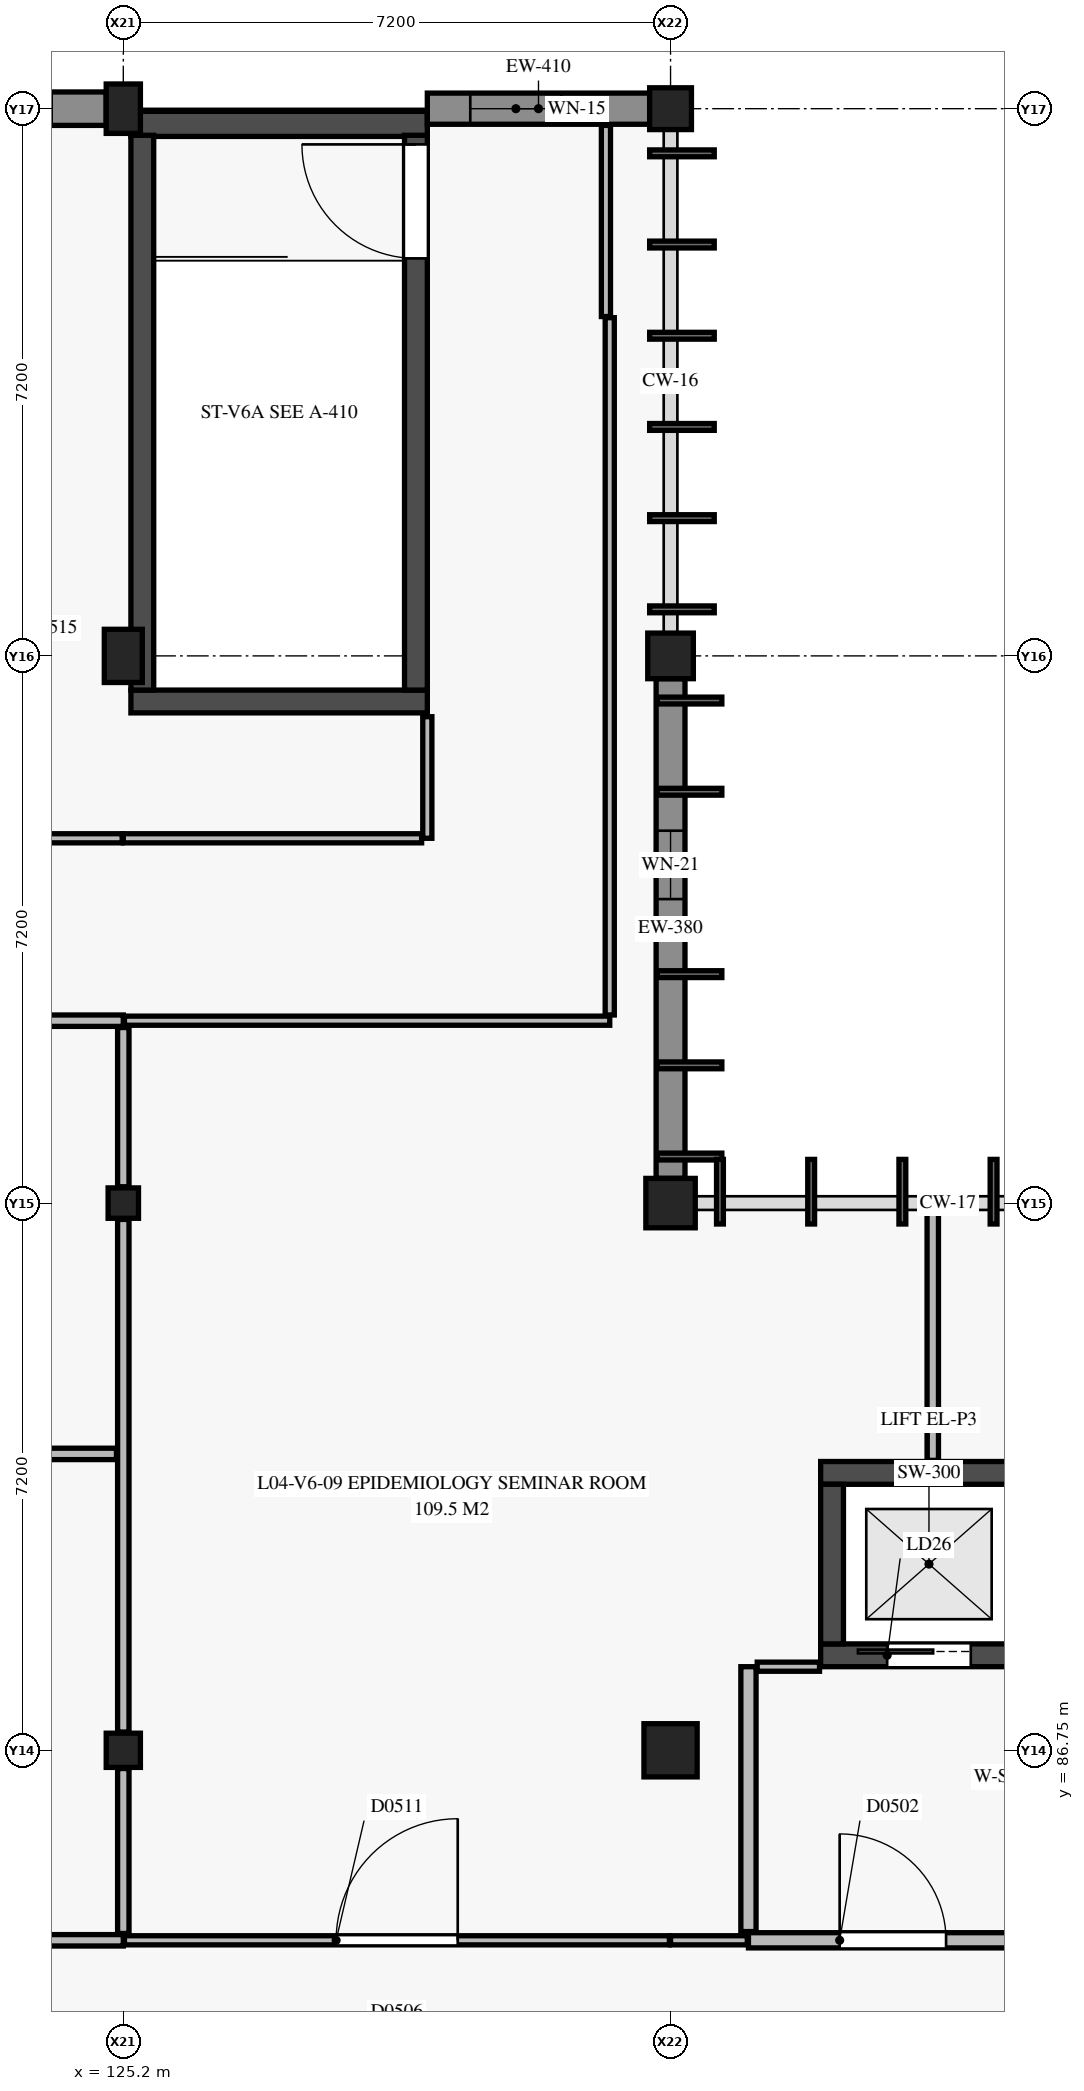
"""IFC4 building model, lengths in metres.
Left out: names, types, materials, properties, quantities, classifications, styles, units other than length and angle.
Written with IfcOpenShell. Run it as: python <this file> out.ifc"""

import sys

from ifc_helpers import new_model, si_unit, direction, frame, frame_2d, origin, origin_2d, place, context, subcontext, project, spatial, rectangle, extrude, element, fill, save


model = new_model("IFC4")
c1 = context("Model", 3, precision=1e-05, world=origin(), true_north=direction((0.0, 1.0)))
c2 = subcontext(c1, "Body", "Model", "MODEL_VIEW")
j1 = project(units=[si_unit("LENGTHUNIT", "METRE"), si_unit("PLANEANGLEUNIT", "RADIAN")], contexts=[c1])
p1 = place(None, origin())
s1 = spatial("IfcSite", under=j1, at=p1, CompositionType="ELEMENT")
p2 = place(p1, origin())
s2 = spatial("IfcBuilding", under=s1, at=p2, CompositionType="ELEMENT")
p3 = place(p2, frame((0.0, 0.0, 17.4)))
s3 = spatial("IfcBuildingStorey", under=s2, at=p3, CompositionType="ELEMENT", Elevation=17.4)
p4 = place(p3, frame((125.2, 86.75, 0.0), z_axis=(0.0, 0.0, 1.0), x_axis=(1.0, 0.0, 0.0)))
e1 = element("IfcColumn", 1, at=p4, inside=s3, PredefinedType="COLUMN", context=c2, shape_type="SweptSolid", body=[
    extrude(rectangle(XDim=0.45, YDim=0.45, at=origin_2d()), origin(), (0.0, 0.0, 1.0), 4.05),
])
p5 = place(p3, frame((125.2, 93.95, 0.0), z_axis=(0.0, 0.0, 1.0), x_axis=(1.0, 0.0, 0.0)))
e2 = element("IfcColumn", 2, at=p5, inside=s3, PredefinedType="COLUMN", context=c2, shape_type="SweptSolid", body=[
    extrude(rectangle(XDim=0.4, YDim=0.4, at=origin_2d()), origin(), (0.0, 0.0, 1.0), 4.36),
])
p6 = place(p3, frame((125.2, 101.15, 0.0), z_axis=(0.0, 0.0, 1.0), x_axis=(1.0, 0.0, 0.0)))
e3 = element("IfcColumn", 3, at=p6, inside=s3, PredefinedType="COLUMN", context=c2, shape_type="SweptSolid", body=[
    extrude(rectangle(XDim=0.5, YDim=0.7, at=origin_2d()), origin(), (0.0, 0.0, 1.0), 4.05),
])
p7 = place(p3, frame((125.2, 108.35, 0.0), z_axis=(0.0, 0.0, 1.0), x_axis=(1.0, 0.0, 0.0)))
e4 = element("IfcColumn", 4, at=p7, inside=s3, PredefinedType="COLUMN", context=c2, shape_type="SweptSolid", body=[
    extrude(rectangle(XDim=0.45, YDim=0.65, at=origin_2d()), origin(), (0.0, 0.0, 1.0), 4.36),
])
p8 = place(p3, frame((132.4, 86.75, 0.0), z_axis=(0.0, 0.0, 1.0), x_axis=(1.0, 0.0, 0.0)))
e5 = element("IfcColumn", 5, at=p8, inside=s3, PredefinedType="COLUMN", context=c2, shape_type="SweptSolid", body=[
    extrude(rectangle(XDim=0.7, YDim=0.7, at=origin_2d()), origin(), (0.0, 0.0, 1.0), 4.05),
])
p9 = place(p3, frame((132.4, 93.95, 0.0), z_axis=(0.0, 0.0, 1.0), x_axis=(1.0, 0.0, 0.0)))
e6 = element("IfcColumn", 6, at=p9, inside=s3, PredefinedType="COLUMN", context=c2, shape_type="SweptSolid", body=[
    extrude(rectangle(XDim=0.65, YDim=0.65, at=origin_2d()), origin(), (0.0, 0.0, 1.0), 4.36),
])
p10 = place(p3, frame((132.4, 101.15, 0.0), z_axis=(0.0, 0.0, 1.0), x_axis=(1.0, 0.0, 0.0)))
e7 = element("IfcColumn", 7, at=p10, inside=s3, PredefinedType="COLUMN", context=c2, shape_type="SweptSolid", body=[
    extrude(rectangle(XDim=0.6, YDim=0.6, at=origin_2d()), origin(), (0.0, 0.0, 1.0), 4.05),
])
p11 = place(p3, frame((132.4, 108.35, 0.0), z_axis=(0.0, 0.0, 1.0), x_axis=(1.0, 0.0, 0.0)))
e8 = element("IfcColumn", 8, at=p11, inside=s3, PredefinedType="COLUMN", context=c2, shape_type="SweptSolid", body=[
    extrude(rectangle(XDim=0.55, YDim=0.55, at=origin_2d()), origin(), (0.0, 0.0, 1.0), 4.36),
])
p12 = place(p3, frame((125.3, 100.55, 0.0), z_axis=(0.0, 0.0, 1.0), x_axis=(1.0, 0.0, 0.0)))
e9 = element("IfcWall", 9, at=p12, inside=s3, PredefinedType="SHEAR", context=c2, shape_type="SweptSolid", body=[
    extrude(rectangle(XDim=3.9, YDim=0.3, at=frame_2d((1.95, 0.0))), origin(), (0.0, 0.0, 1.0), 4.2),
])
p13 = place(p3, frame((125.3, 108.15, 0.0), z_axis=(0.0, 0.0, 1.0), x_axis=(1.0, 0.0, 0.0)))
e10 = element("IfcWall", 10, at=p13, inside=s3, PredefinedType="SHEAR", context=c2, shape_type="SweptSolid", body=[
    extrude(rectangle(XDim=3.9, YDim=0.33, at=frame_2d((1.95, 0.0))), origin(), (0.0, 0.0, 1.0), 4.2),
])
p14 = place(p3, frame((125.45, 100.7, 0.0), z_axis=(0.0, 0.0, 1.0), x_axis=(0.0, 1.0, 0.0)))
e11 = element("IfcWall", 11, at=p14, inside=s3, PredefinedType="SHEAR", context=c2, shape_type="SweptSolid", body=[
    extrude(rectangle(XDim=7.3, YDim=0.3, at=frame_2d((3.65, 0.0))), origin(), (0.0, 0.0, 1.0), 4.2),
])
p15 = place(p3, frame((129.05, 100.7, 0.0), z_axis=(0.0, 0.0, 1.0), x_axis=(0.0, 1.0, 0.0)))
e12 = element("IfcWall", 12, at=p15, inside=s3, PredefinedType="SHEAR", context=c2, shape_type="SweptSolid", body=[
    extrude(rectangle(XDim=7.3, YDim=0.3, at=frame_2d((3.65, 0.0))), origin(), (0.0, 0.0, 1.0), 4.2),
])
p16 = place(p15, frame((5.68, 0.0, 0.0)))
e13 = element("IfcOpeningElement", 13, at=p16, cuts=e12, PredefinedType="OPENING", context=c2, shape_type="SweptSolid", body=[
    extrude(rectangle(XDim=1.5, YDim=2.15, at=frame_2d((0.75, 1.075))), frame((0.0, 0.16, 0.0), z_axis=(0.0, -1.0, 0.0), x_axis=(1.0, 0.0, 0.0)), (0.0, 0.0, 1.0), 0.32),
])
p17 = place(p3, frame((134.375, 88.0, 0.0), z_axis=(0.0, 0.0, 1.0), x_axis=(1.0, 0.0, 0.0)))
e14 = element("IfcWall", 14, at=p17, inside=s3, PredefinedType="SHEAR", context=c2, shape_type="SweptSolid", body=[
    extrude(rectangle(XDim=2.85, YDim=0.3, at=frame_2d((1.425, 0.0))), origin(), (0.0, 0.0, 1.0), 3.95),
])
p18 = place(p17, frame((0.875, 0.0, 0.0)))
e15 = element("IfcOpeningElement", 15, at=p18, cuts=e14, PredefinedType="OPENING", context=c2, shape_type="SweptSolid", body=[
    extrude(rectangle(XDim=1.1, YDim=2.15, at=frame_2d((0.55, 1.075))), frame((0.0, 0.16, 0.0), z_axis=(0.0, -1.0, 0.0), x_axis=(1.0, 0.0, 0.0)), (0.0, 0.0, 1.0), 0.32),
])
p19 = place(p3, frame((134.375, 90.4, 0.0), z_axis=(0.0, 0.0, 1.0), x_axis=(1.0, 0.0, 0.0)))
e16 = element("IfcWall", 16, at=p19, inside=s3, PredefinedType="SHEAR", context=c2, shape_type="SweptSolid", body=[
    extrude(rectangle(XDim=2.85, YDim=0.3, at=frame_2d((1.425, 0.0))), origin(), (0.0, 0.0, 1.0), 3.95),
])
p20 = place(p3, frame((134.525, 88.15, 0.0), z_axis=(0.0, 0.0, 1.0), x_axis=(0.0, 1.0, 0.0)))
e17 = element("IfcWall", 17, at=p20, inside=s3, PredefinedType="SHEAR", context=c2, shape_type="SweptSolid", body=[
    extrude(rectangle(XDim=2.1, YDim=0.3, at=frame_2d((1.05, 0.0))), origin(), (0.0, 0.0, 1.0), 3.95),
])
p21 = place(p3, frame((121.74, 108.35, 0.0), z_axis=(0.0, 0.0, 1.0), x_axis=(1.0, 0.0, 0.0)))
e18 = element("IfcWall", 18, at=p21, inside=s3, PredefinedType="USERDEFINED", context=c2, shape_type="SweptSolid", body=[
    extrude(rectangle(XDim=3.235, YDim=0.44, at=frame_2d((1.618, 0.0))), origin(), (0.0, 0.0, 1.0), 3.38),
])
p22 = place(p21, frame((0.718, 0.0, 0.9)))
e19 = element("IfcOpeningElement", 19, at=p22, cuts=e18, PredefinedType="OPENING", context=c2, shape_type="SweptSolid", body=[
    extrude(rectangle(XDim=1.8, YDim=1.5, at=frame_2d((0.9, 0.75))), frame((0.0, 0.23, 0.0), z_axis=(0.0, -1.0, 0.0), x_axis=(1.0, 0.0, 0.0)), (0.0, 0.0, 1.0), 0.46),
])
p23 = place(p3, frame((129.2, 108.35, 0.0), z_axis=(0.0, 0.0, 1.0), x_axis=(1.0, 0.0, 0.0)))
e20 = element("IfcWall", 20, at=p23, inside=s3, PredefinedType="USERDEFINED", context=c2, shape_type="SweptSolid", body=[
    extrude(rectangle(XDim=2.925, YDim=0.41, at=frame_2d((1.462, 0.0))), origin(), (0.0, 0.0, 1.0), 3.38),
])
p24 = place(p23, frame((0.565, 0.0, 0.6)))
e21 = element("IfcOpeningElement", 21, at=p24, cuts=e20, PredefinedType="OPENING", context=c2, shape_type="SweptSolid", body=[
    extrude(rectangle(XDim=1.2, YDim=2.2, at=frame_2d((0.6, 1.1))), frame((0.0, 0.215, 0.0), z_axis=(0.0, -1.0, 0.0), x_axis=(1.0, 0.0, 0.0)), (0.0, 0.0, 1.0), 0.43),
])
p25 = place(p3, frame((132.4, 100.85, 0.0), z_axis=(0.0, 0.0, 1.0), x_axis=(0.0, -1.0, 0.0)))
e22 = element("IfcWall", 22, at=p25, inside=s3, PredefinedType="USERDEFINED", context=c2, shape_type="SweptSolid", body=[
    extrude(rectangle(XDim=6.575, YDim=0.38, at=frame_2d((3.288, 0.0))), origin(), (0.0, 0.0, 1.0), 3.38),
])
p26 = place(p25, frame((2.0, 0.0, 0.9)))
e23 = element("IfcOpeningElement", 23, at=p26, cuts=e22, PredefinedType="OPENING", context=c2, shape_type="SweptSolid", body=[
    extrude(rectangle(XDim=0.9, YDim=1.2, at=frame_2d((0.45, 0.6))), frame((0.0, 0.2, 0.0), z_axis=(0.0, -1.0, 0.0), x_axis=(1.0, 0.0, 0.0)), (0.0, 0.0, 1.0), 0.4),
])
p27 = place(p3, frame((133.425, 84.25, 0.0), z_axis=(0.0, 0.0, 1.0), x_axis=(1.0, 0.0, 0.0)))
e24 = element("IfcWall", 24, at=p27, inside=s3, PredefinedType="PARTITIONING", context=c2, shape_type="SweptSolid", body=[
    extrude(rectangle(XDim=3.8, YDim=0.2, at=frame_2d((1.9, 0.0))), origin(), (0.0, 0.0, 1.0), 3.95),
])
p28 = place(p27, frame((1.2, 0.0, 0.0)))
e25 = element("IfcOpeningElement", 25, at=p28, cuts=e24, PredefinedType="OPENING", context=c2, shape_type="SweptSolid", body=[
    extrude(rectangle(XDim=1.4, YDim=2.2, at=frame_2d((0.7, 1.1))), frame((0.0, 0.11, 0.0), z_axis=(0.0, -1.0, 0.0), x_axis=(1.0, 0.0, 0.0)), (0.0, 0.0, 1.0), 0.22),
])
p29 = place(p3, frame((133.425, 84.365, 0.0), z_axis=(0.0, 0.0, 1.0), x_axis=(0.0, 1.0, 0.0)))
e26 = element("IfcWall", 26, at=p29, inside=s3, PredefinedType="PARTITIONING", context=c2, shape_type="SweptSolid", body=[
    extrude(rectangle(XDim=3.485, YDim=0.2, at=frame_2d((1.743, 0.0))), origin(), (0.0, 0.0, 1.0), 3.44),
])
p30 = place(p3, frame((122.8, 84.25, 0.0), z_axis=(0.0, 0.0, 1.0), x_axis=(1.0, 0.0, 0.0)))
e27 = element("IfcWall", 27, at=p30, inside=s3, PredefinedType="PARTITIONING", context=c2, shape_type="SweptSolid", body=[
    extrude(rectangle(XDim=2.4, YDim=0.15, at=frame_2d((1.2, 0.0))), origin(), (0.0, 0.0, 1.0), 3.95),
])
p31 = place(p3, frame((122.89, 96.35, 0.0), z_axis=(0.0, 0.0, 1.0), x_axis=(1.0, 0.0, 0.0)))
e28 = element("IfcWall", 28, at=p31, inside=s3, PredefinedType="PARTITIONING", context=c2, shape_type="SweptSolid", body=[
    extrude(rectangle(XDim=2.31, YDim=0.15, at=frame_2d((1.155, 0.0))), origin(), (0.0, 0.0, 1.0), 3.95),
])
p32 = place(p3, frame((132.4, 84.25, 0.0), z_axis=(0.0, 0.0, 1.0), x_axis=(1.0, 0.0, 0.0)))
e29 = element("IfcWall", 29, at=p32, inside=s3, PredefinedType="PARTITIONING", context=c2, shape_type="SweptSolid", body=[
    extrude(rectangle(XDim=1.01, YDim=0.12, at=frame_2d((0.505, 0.0))), origin(), (0.0, 0.0, 1.0), 3.95),
])
p33 = place(p3, frame((125.215, 84.25, 0.0), z_axis=(0.0, 0.0, 1.0), x_axis=(1.0, 0.0, 0.0)))
e30 = element("IfcWall", 30, at=p33, inside=s3, PredefinedType="PARTITIONING", context=c2, shape_type="SweptSolid", body=[
    extrude(rectangle(XDim=7.17, YDim=0.12, at=frame_2d((3.585, 0.0))), origin(), (0.0, 0.0, 1.0), 3.95),
])
p34 = place(p33, frame((2.785, 0.0, 0.0)))
e31 = element("IfcOpeningElement", 31, at=p34, cuts=e30, PredefinedType="OPENING", context=c2, shape_type="SweptSolid", body=[
    extrude(rectangle(XDim=1.6, YDim=2.25, at=frame_2d((0.8, 1.125))), frame((0.0, 0.07, 0.0), z_axis=(0.0, -1.0, 0.0), x_axis=(1.0, 0.0, 0.0)), (0.0, 0.0, 1.0), 0.14),
])
p35 = place(p3, frame((125.215, 96.35, 0.0), z_axis=(0.0, 0.0, 1.0), x_axis=(1.0, 0.0, 0.0)))
e32 = element("IfcWall", 32, at=p35, inside=s3, PredefinedType="PARTITIONING", context=c2, shape_type="SweptSolid", body=[
    extrude(rectangle(XDim=6.385, YDim=0.12, at=frame_2d((3.192, 0.0))), origin(), (0.0, 0.0, 1.0), 3.95),
])
p36 = place(p3, frame((131.6, 96.425, 0.0), z_axis=(0.0, 0.0, 1.0), x_axis=(0.0, 1.0, 0.0)))
e33 = element("IfcWall", 33, at=p36, inside=s3, PredefinedType="PARTITIONING", context=c2, shape_type="SweptSolid", body=[
    extrude(rectangle(XDim=9.175, YDim=0.12, at=frame_2d((4.587, 0.0))), origin(), (0.0, 0.0, 1.0), 3.95),
])
p37 = place(p3, frame((131.55, 105.615, 0.0), z_axis=(0.0, 0.0, 1.0), x_axis=(0.0, 1.0, 0.0)))
e34 = element("IfcWall", 34, at=p37, inside=s3, PredefinedType="PARTITIONING", context=c2, shape_type="SweptSolid", body=[
    extrude(rectangle(XDim=2.515, YDim=0.12, at=frame_2d((1.257, 0.0))), origin(), (0.0, 0.0, 1.0), 3.95),
])
p38 = place(p3, frame((129.2, 98.75, 0.0), z_axis=(0.0, 0.0, 1.0), x_axis=(0.0, 1.0, 0.0)))
e35 = element("IfcWall", 35, at=p38, inside=s3, PredefinedType="PARTITIONING", context=c2, shape_type="SweptSolid", body=[
    extrude(rectangle(XDim=1.6, YDim=0.12, at=frame_2d((0.8, 0.0))), origin(), (0.0, 0.0, 1.0), 3.95),
])
p39 = place(p3, frame((125.2, 98.75, 0.0), z_axis=(0.0, 0.0, 1.0), x_axis=(1.0, 0.0, 0.0)))
e36 = element("IfcWall", 36, at=p39, inside=s3, PredefinedType="PARTITIONING", context=c2, shape_type="SweptSolid", body=[
    extrude(rectangle(XDim=3.925, YDim=0.12, at=frame_2d((1.962, 0.0))), origin(), (0.0, 0.0, 1.0), 3.95),
])
p40 = place(p3, frame((122.8, 98.75, 0.0), z_axis=(0.0, 0.0, 1.0), x_axis=(1.0, 0.0, 0.0)))
e37 = element("IfcWall", 37, at=p40, inside=s3, PredefinedType="PARTITIONING", context=c2, shape_type="SweptSolid", body=[
    extrude(rectangle(XDim=2.385, YDim=0.12, at=frame_2d((1.192, 0.0))), origin(), (0.0, 0.0, 1.0), 3.95),
])
p41 = place(p3, frame((125.2, 84.34, 0.0), z_axis=(0.0, 0.0, 1.0), x_axis=(0.0, 1.0, 0.0)))
e38 = element("IfcWall", 38, at=p41, inside=s3, PredefinedType="PARTITIONING", context=c2, shape_type="SweptSolid", body=[
    extrude(rectangle(XDim=2.17, YDim=0.15, at=frame_2d((1.085, 0.0))), origin(), (0.0, 0.0, 1.0), 3.95),
])
p42 = place(p3, frame((125.2, 86.99, 0.0), z_axis=(0.0, 0.0, 1.0), x_axis=(0.0, 1.0, 0.0)))
e39 = element("IfcWall", 39, at=p42, inside=s3, PredefinedType="PARTITIONING", context=c2, shape_type="SweptSolid", body=[
    extrude(rectangle(XDim=6.745, YDim=0.15, at=frame_2d((3.373, 0.0))), origin(), (0.0, 0.0, 1.0), 3.95),
])
p43 = place(p3, frame((125.2, 94.165, 0.0), z_axis=(0.0, 0.0, 1.0), x_axis=(0.0, 1.0, 0.0)))
e40 = element("IfcWall", 40, at=p43, inside=s3, PredefinedType="PARTITIONING", context=c2, shape_type="SweptSolid", body=[
    extrude(rectangle(XDim=2.095, YDim=0.15, at=frame_2d((1.047, 0.0))), origin(), (0.0, 0.0, 1.0), 3.95),
])
p44 = place(p3, frame((122.89, 90.65, 0.0), z_axis=(0.0, 0.0, 1.0), x_axis=(1.0, 0.0, 0.0)))
e41 = element("IfcWall", 41, at=p44, inside=s3, PredefinedType="PARTITIONING", context=c2, shape_type="SweptSolid", body=[
    extrude(rectangle(XDim=2.22, YDim=0.15, at=frame_2d((1.11, 0.0))), origin(), (0.0, 0.0, 1.0), 3.95),
])
p45 = place(p3, frame((135.85, 90.565, 0.0), z_axis=(0.0, 0.0, 1.0), x_axis=(0.0, 1.0, 0.0)))
e42 = element("IfcWall", 42, at=p45, inside=s3, PredefinedType="PARTITIONING", context=c2, shape_type="SweptSolid", body=[
    extrude(rectangle(XDim=3.28, YDim=0.15, at=frame_2d((1.64, 0.0))), origin(), (0.0, 0.0, 1.0), 3.22),
])
p46 = place(p3, frame((133.54, 87.85, 0.0), z_axis=(0.0, 0.0, 1.0), x_axis=(1.0, 0.0, 0.0)))
e43 = element("IfcWall", 43, at=p46, inside=s3, PredefinedType="PARTITIONING", context=c2, shape_type="SweptSolid", body=[
    extrude(rectangle(XDim=0.82, YDim=0.12, at=frame_2d((0.41, 0.0))), origin(), (0.0, 0.0, 1.0), 3.95),
])
p47 = place(p24, origin())
e44 = element("IfcWindow", 44, at=p47, inside=s3, PartitioningType="SINGLE_PANEL", PredefinedType="WINDOW", context=c2, shape_type="SweptSolid", body=[
    extrude(rectangle(XDim=1.2, YDim=2.2, at=frame_2d((0.6, 1.1))), frame((0.0, 0.03, 0.0), z_axis=(0.0, -1.0, 0.0), x_axis=(1.0, 0.0, 0.0)), (0.0, 0.0, 1.0), 0.06),
])
fill(e21, e44)
p48 = place(p26, origin())
e45 = element("IfcWindow", 45, at=p48, inside=s3, PartitioningType="SINGLE_PANEL", PredefinedType="WINDOW", context=c2, shape_type="SweptSolid", body=[
    extrude(rectangle(XDim=0.9, YDim=1.2, at=frame_2d((0.45, 0.6))), frame((0.0, 0.03, 0.0), z_axis=(0.0, -1.0, 0.0), x_axis=(1.0, 0.0, 0.0)), (0.0, 0.0, 1.0), 0.06),
])
fill(e23, e45)
p49 = place(p16, origin())
e46 = element("IfcDoor", 46, at=p49, inside=s3, OperationType="SINGLE_SWING_RIGHT", PredefinedType="DOOR", context=c2, shape_type="SweptSolid", body=[
    extrude(rectangle(XDim=1.5, YDim=2.15, at=frame_2d((0.75, 1.075))), frame((0.0, 0.025, 0.0), z_axis=(0.0, -1.0, 0.0), x_axis=(1.0, 0.0, 0.0)), (0.0, 0.0, 1.0), 0.05),
])
fill(e13, e46)
p50 = place(p18, origin())
e47 = element("IfcDoor", 47, at=p50, inside=s3, OperationType="SLIDING_TO_LEFT", PredefinedType="DOOR", context=c2, shape_type="SweptSolid", body=[
    extrude(rectangle(XDim=1.1, YDim=2.15, at=frame_2d((0.55, 1.075))), frame((0.0, 0.025, 0.0), z_axis=(0.0, -1.0, 0.0), x_axis=(1.0, 0.0, 0.0)), (0.0, 0.0, 1.0), 0.05),
])
fill(e15, e47)
p51 = place(p28, origin())
e48 = element("IfcDoor", 48, at=p51, inside=s3, OperationType="SINGLE_SWING_LEFT", PredefinedType="DOOR", context=c2, shape_type="SweptSolid", body=[
    extrude(rectangle(XDim=1.4, YDim=2.2, at=frame_2d((0.7, 1.1))), frame((0.0, 0.025, 0.0), z_axis=(0.0, -1.0, 0.0), x_axis=(1.0, 0.0, 0.0)), (0.0, 0.0, 1.0), 0.05),
])
fill(e25, e48)
p52 = place(p34, origin())
e49 = element("IfcDoor", 49, at=p52, inside=s3, OperationType="SINGLE_SWING_RIGHT", PredefinedType="DOOR", context=c2, shape_type="SweptSolid", body=[
    extrude(rectangle(XDim=1.6, YDim=2.25, at=frame_2d((0.8, 1.125))), frame((0.0, 0.025, 0.0), z_axis=(0.0, -1.0, 0.0), x_axis=(1.0, 0.0, 0.0)), (0.0, 0.0, 1.0), 0.05),
])
fill(e31, e49)
save(model, sys.argv[1])
